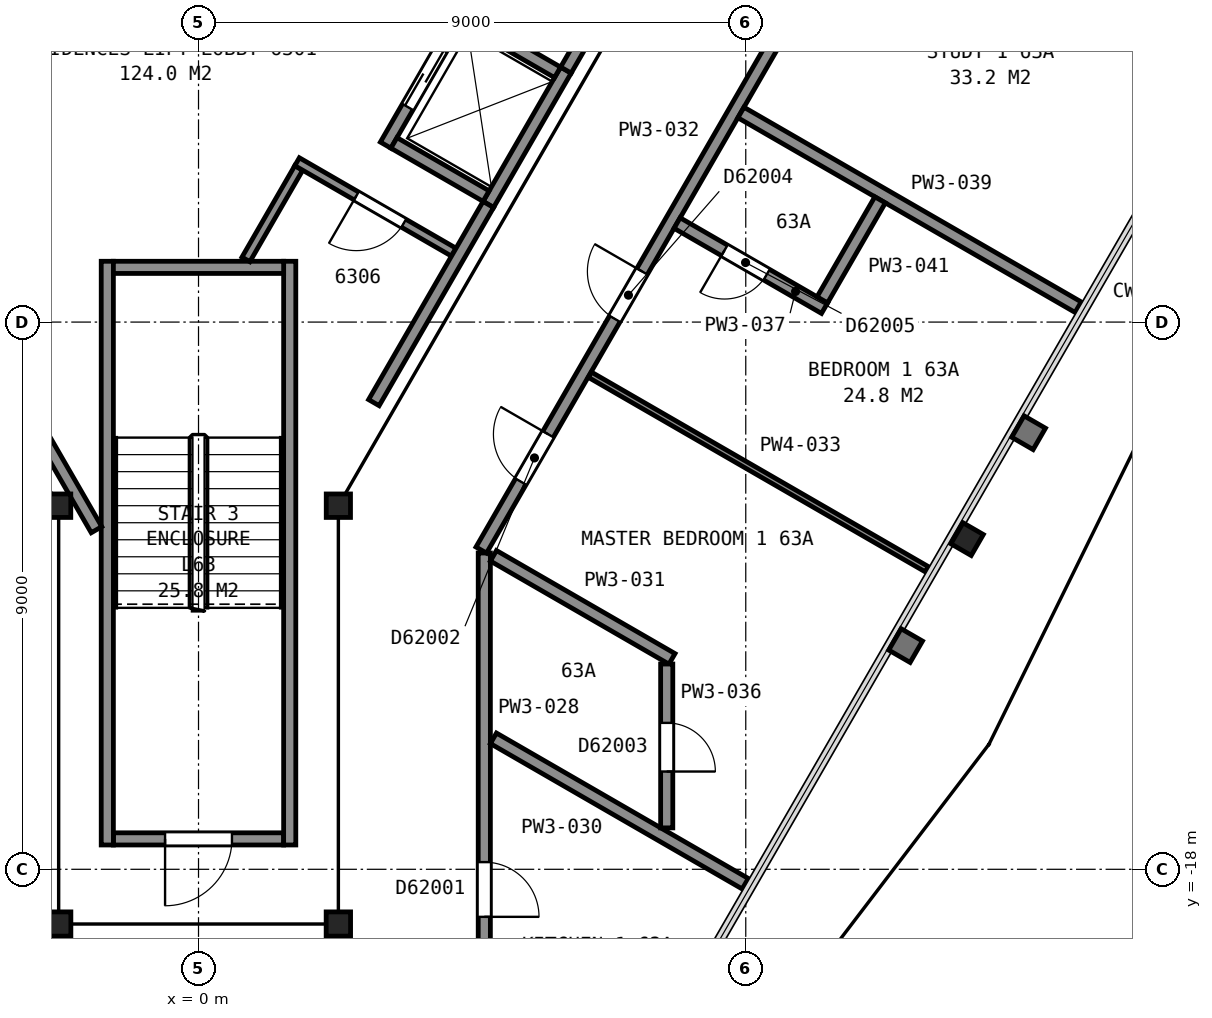
"""IFC4 building model, lengths in metres.
Left out: names, types, materials, properties, quantities, classifications, styles, units other than length and angle.
Written with IfcOpenShell. Run it as: python <this file> out.ifc"""

import sys

from ifc_helpers import new_model, si_unit, direction, frame, frame_2d, origin, origin_2d, place, context, subcontext, project, spatial, rectangle, i_section, extrude, element, fill, save


model = new_model("IFC4")
c1 = context("Model", 3, precision=1e-05, world=origin(), true_north=direction((0.0, 1.0)))
c2 = subcontext(c1, "Body", "Model", "MODEL_VIEW")
j1 = project(units=[si_unit("LENGTHUNIT", "METRE"), si_unit("PLANEANGLEUNIT", "RADIAN")], contexts=[c1])
p1 = place(None, origin())
s1 = spatial("IfcSite", under=j1, at=p1, CompositionType="ELEMENT")
p2 = place(p1, origin())
s2 = spatial("IfcBuilding", under=s1, at=p2, CompositionType="ELEMENT")
p3 = place(p2, frame((0.0, 0.0, 250.8)))
s3 = spatial("IfcBuildingStorey", under=s2, at=p3, CompositionType="ELEMENT", Elevation=250.8)
for number, where, z_axis, x_axis in (
    (1, (12.64, -12.57, 0.0), (0.0, 0.0, 1.0), (-0.5, -0.866, 0.0)),
    (2, (-2.3, -12.02, 0.0), (0.0, 0.0, 1.0), (1.0, 0.0, 0.0)),
):
    element("IfcColumn", number, at=place(p3, frame(where, z_axis=z_axis, x_axis=x_axis)), inside=s3, PredefinedType="COLUMN", context=c2, shape_type="SweptSolid", body=[
        extrude(i_section(OverallWidth=0.399, OverallDepth=0.386, WebThickness=0.021, FlangeThickness=0.033, FilletRadius=0.015, at=origin_2d()), origin(), (0.0, 0.0, 1.0), 3.7),
    ])
for number, where, z_axis, x_axis in (
    (3, (-2.3, -18.9, 0.0), (0.0, 0.0, 1.0), (-1.0, 0.0, 0.0)),
    (4, (2.3, -18.9, 0.0), (0.0, 0.0, 1.0), (-1.0, 0.0, 0.0)),
):
    element("IfcColumn", number, at=place(p3, frame(where, z_axis=z_axis, x_axis=x_axis)), inside=s3, PredefinedType="COLUMN", context=c2, shape_type="SweptSolid", body=[
        extrude(i_section(OverallWidth=0.401, OverallDepth=0.399, WebThickness=0.025, FlangeThickness=0.04, FilletRadius=0.015, at=origin_2d()), origin(), (0.0, 0.0, 1.0), 3.7),
    ])
p4 = place(p3, frame((2.3, -12.02, 0.0), z_axis=(0.0, 0.0, 1.0), x_axis=(1.0, 0.0, 0.0)))
e5 = element("IfcColumn", 5, at=p4, inside=s3, PredefinedType="COLUMN", context=c2, shape_type="SweptSolid", body=[
    extrude(i_section(OverallWidth=0.399, OverallDepth=0.386, WebThickness=0.021, FlangeThickness=0.033, FilletRadius=0.015, at=origin_2d()), origin(), (0.0, 0.0, 1.0), 3.7),
])
p5 = place(p3, frame((-1.4, -17.5, 0.0), z_axis=(0.0, 0.0, 1.0), x_axis=(1.0, 0.0, 0.0)))
e6 = element("IfcWall", 6, at=p5, inside=s3, PredefinedType="PARTITIONING", context=c2, shape_type="SweptSolid", body=[
    extrude(rectangle(XDim=2.8, YDim=0.2, at=frame_2d((1.4, 0.0))), origin(), (0.0, 0.0, 1.0), 3.45),
])
p6 = place(p5, frame((0.85, 0.0, 0.0)))
e7 = element("IfcOpeningElement", 7, at=p6, cuts=e6, PredefinedType="OPENING", context=c2, shape_type="SweptSolid", body=[
    extrude(rectangle(XDim=1.1, YDim=2.1, at=frame_2d((0.55, 1.05))), frame((0.0, 0.11, 0.0), z_axis=(0.0, -1.0, 0.0), x_axis=(1.0, 0.0, 0.0)), (0.0, 0.0, 1.0), 0.22),
])
for number, where, z_axis, x_axis in (
    (8, (1.5, -8.0, 0.0), (0.0, 0.0, 1.0), (0.0, -1.0, 0.0)),
    (9, (-1.5, -8.0, 0.0), (0.0, 0.0, 1.0), (0.0, -1.0, 0.0)),
):
    element("IfcWall", number, at=place(p3, frame(where, z_axis=z_axis, x_axis=x_axis)), inside=s3, PredefinedType="PARTITIONING", context=c2, shape_type="SweptSolid", body=[
        extrude(rectangle(XDim=9.6, YDim=0.2, at=frame_2d((4.8, 0.0))), origin(), (0.0, 0.0, 1.0), 3.45),
    ])
p7 = place(p3, frame((-1.4, -8.1, 0.0), z_axis=(0.0, 0.0, 1.0), x_axis=(1.0, 0.0, 0.0)))
e10 = element("IfcWall", 10, at=p7, inside=s3, PredefinedType="PARTITIONING", context=c2, shape_type="SweptSolid", body=[
    extrude(rectangle(XDim=2.8, YDim=0.2, at=frame_2d((1.4, 0.0))), origin(), (0.0, 0.0, 1.0), 3.45),
])
p8 = place(p3, frame((4.766, -7.065, 0.0), z_axis=(0.0, 0.0, 1.0), x_axis=(0.499948979701, 0.866054858364, 0.0)))
e11 = element("IfcWall", 11, at=p8, inside=s3, PredefinedType="PARTITIONING", context=c2, shape_type="SweptSolid", body=[
    extrude(rectangle(XDim=2.55, YDim=0.2, at=frame_2d((1.275, 0.0))), origin(), (0.0, 0.0, 1.0), 3.7),
])
p9 = place(p3, frame((3.077, -6.09, 0.0), z_axis=(0.0, 0.0, 1.0), x_axis=(0.500062241894, 0.865989465428, 0.0)))
e12 = element("IfcWall", 12, at=p9, inside=s3, PredefinedType="PARTITIONING", context=c2, shape_type="SweptSolid", body=[
    extrude(rectangle(XDim=2.55, YDim=0.2, at=frame_2d((1.275, 0.0))), origin(), (0.0, 0.0, 1.0), 3.7),
])
p10 = place(p9, frame((0.725, 0.0, 0.0)))
e13 = element("IfcOpeningElement", 13, at=p10, cuts=e12, PredefinedType="OPENING", context=c2, shape_type="SweptSolid", body=[
    extrude(rectangle(XDim=1.1, YDim=2.1, at=frame_2d((0.55, 1.05))), frame((0.0, 0.11, 0.0), z_axis=(0.0, -1.0, 0.0), x_axis=(1.0, 0.0, 0.0)), (0.0, 0.0, 1.0), 0.22),
])
p11 = place(p3, frame((5.905, -4.893, 0.0), z_axis=(0.0, 0.0, 1.0), x_axis=(-0.866002029911, 0.500040482552, 0.0)))
e14 = element("IfcWall", 14, at=p11, inside=s3, PredefinedType="PARTITIONING", context=c2, shape_type="SweptSolid", body=[
    extrude(rectangle(XDim=1.75, YDim=0.2, at=frame_2d((0.875, 0.0))), origin(), (0.0, 0.0, 1.0), 3.7),
])
p12 = place(p3, frame((4.73, -6.928, 0.0), z_axis=(0.0, 0.0, 1.0), x_axis=(-0.866036909293, 0.499980071345, 0.0)))
e15 = element("IfcWall", 15, at=p12, inside=s3, PredefinedType="PARTITIONING", context=c2, shape_type="SweptSolid", body=[
    extrude(rectangle(XDim=1.75, YDim=0.2, at=frame_2d((0.875, 0.0))), origin(), (0.0, 0.0, 1.0), 3.7),
])
p13 = place(p3, frame((-4.655, -7.257, 0.0), z_axis=(0.0, 0.0, 1.0), x_axis=(0.499966124405, -0.866044960985, 0.0)))
e16 = element("IfcWall", 16, at=p13, inside=s3, PredefinedType="PARTITIONING", context=c2, shape_type="SweptSolid", body=[
    extrude(rectangle(XDim=5.956, YDim=0.2, at=frame_2d((2.978, 0.0))), origin(), (0.0, 0.0, 1.0), 3.45),
])
p14 = place(p13, frame((0.45, 0.0, 0.0)))
e17 = element("IfcOpeningElement", 17, at=p14, cuts=e16, PredefinedType="OPENING", context=c2, shape_type="SweptSolid", body=[
    extrude(rectangle(XDim=1.8, YDim=2.1, at=frame_2d((0.9, 1.05))), frame((0.0, 0.11, 0.0), z_axis=(0.0, -1.0, 0.0), x_axis=(1.0, 0.0, 0.0)), (0.0, 0.0, 1.0), 0.22),
])
p15 = place(p3, frame((0.78, -7.97, 0.0), z_axis=(0.0, 0.0, 1.0), x_axis=(0.500022437694, 0.866012448988, 0.0)))
e18 = element("IfcWall", 18, at=p15, inside=s3, PredefinedType="PARTITIONING", context=c2, shape_type="SweptSolid", body=[
    extrude(rectangle(XDim=1.738, YDim=0.15, at=frame_2d((0.869, 0.0))), origin(), (0.0, 0.0, 1.0), 3.45),
])
p16 = place(p3, frame((4.198, -7.85, 0.0), z_axis=(0.0, 0.0, 1.0), x_axis=(-0.866017493347, 0.500013701029, 0.0)))
e19 = element("IfcWall", 19, at=p16, inside=s3, PredefinedType="PARTITIONING", context=c2, shape_type="SweptSolid", body=[
    extrude(rectangle(XDim=2.975, YDim=0.15, at=frame_2d((1.488, 0.0))), origin(), (0.0, 0.0, 1.0), 3.45),
])
p17 = place(p16, frame((0.95, 0.0, 0.0)))
e20 = element("IfcOpeningElement", 20, at=p17, cuts=e19, PredefinedType="OPENING", context=c2, shape_type="SweptSolid", body=[
    extrude(rectangle(XDim=0.9, YDim=2.1, at=frame_2d((0.45, 1.05))), frame((0.0, 0.085, 0.0), z_axis=(0.0, -1.0, 0.0), x_axis=(1.0, 0.0, 0.0)), (0.0, 0.0, 1.0), 0.17),
])
p18 = place(p3, frame((2.884, -10.325, 0.0), z_axis=(0.0, 0.0, 1.0), x_axis=(0.500094932804, 0.865970587366, 0.0)))
e21 = element("IfcWall", 21, at=p18, inside=s3, PredefinedType="PARTITIONING", context=c2, shape_type="SweptSolid", body=[
    extrude(rectangle(XDim=3.763, YDim=0.2, at=frame_2d((1.882, 0.0))), origin(), (0.0, 0.0, 1.0), 3.45),
])
p19 = place(p3, frame((6.042, -4.855, 0.0), z_axis=(0.0, 0.0, 1.0), x_axis=(0.500252727967, 0.865879442048, 0.0)))
e22 = element("IfcWall", 22, at=p19, inside=s3, PredefinedType="PARTITIONING", context=c2, shape_type="SweptSolid", body=[
    extrude(rectangle(XDim=2.617, YDim=0.2, at=frame_2d((1.309, 0.0))), origin(), (0.0, 0.0, 1.0), 3.45),
])
p20 = place(p3, frame((4.7, -12.798, 0.0), z_axis=(0.0, 0.0, 1.0), x_axis=(0.0, -1.0, 0.0)))
e23 = element("IfcWall", 23, at=p20, inside=s3, PredefinedType="PARTITIONING", context=c2, shape_type="SweptSolid", body=[
    extrude(rectangle(XDim=8.452, YDim=0.2, at=frame_2d((4.226, 0.0))), origin(), (0.0, 0.0, 1.0), 2.713),
])
p21 = place(p20, frame((5.084, 0.0, 0.0)))
e24 = element("IfcOpeningElement", 24, at=p21, cuts=e23, PredefinedType="OPENING", context=c2, shape_type="SweptSolid", body=[
    extrude(rectangle(XDim=0.9, YDim=2.1, at=frame_2d((0.45, 1.05))), frame((0.0, 0.11, 0.0), z_axis=(0.0, -1.0, 0.0), x_axis=(1.0, 0.0, 0.0)), (0.0, 0.0, 1.0), 0.22),
])
p22 = place(p3, frame((4.85, -15.846, 0.0), z_axis=(0.0, 0.0, 1.0), x_axis=(0.866007055173, -0.500031779381, 0.0)))
e25 = element("IfcWall", 25, at=p22, inside=s3, PredefinedType="PARTITIONING", context=c2, shape_type="SweptSolid", body=[
    extrude(rectangle(XDim=4.782, YDim=0.2, at=frame_2d((2.391, 0.0))), origin(), (0.0, 0.0, 1.0), 2.713),
])
p23 = place(p3, frame((4.85, -12.844, 0.0), z_axis=(0.0, 0.0, 1.0), x_axis=(0.866005731893, -0.500034071167, 0.0)))
e26 = element("IfcWall", 26, at=p23, inside=s3, PredefinedType="PARTITIONING", context=c2, shape_type="SweptSolid", body=[
    extrude(rectangle(XDim=3.391, YDim=0.2, at=frame_2d((1.695, 0.0))), origin(), (0.0, 0.0, 1.0), 2.713),
])
p24 = place(p3, frame((13.342, 2.306, 0.0), z_axis=(0.0, 0.0, 1.0), x_axis=(-0.499983003136, -0.866035216706, 0.0)))
e27 = element("IfcWall", 27, at=p24, inside=s3, PredefinedType="PARTITIONING", context=c2, shape_type="SweptSolid", body=[
    extrude(rectangle(XDim=17.385, YDim=0.2, at=frame_2d((8.692, 0.0))), origin(), (0.0, 0.0, 1.0), 2.713),
])
p25 = place(p24, frame((15.185, 0.0, 0.0)))
e28 = element("IfcOpeningElement", 28, at=p25, cuts=e27, PredefinedType="OPENING", context=c2, shape_type="SweptSolid", body=[
    extrude(rectangle(XDim=0.9, YDim=2.1, at=frame_2d((0.45, 1.05))), frame((0.0, 0.11, 0.0), z_axis=(0.0, -1.0, 0.0), x_axis=(1.0, 0.0, 0.0)), (0.0, 0.0, 1.0), 0.22),
])
p26 = place(p24, frame((12.094, 0.0, 0.0)))
e29 = element("IfcOpeningElement", 29, at=p26, cuts=e27, PredefinedType="OPENING", context=c2, shape_type="SweptSolid", body=[
    extrude(rectangle(XDim=0.9, YDim=2.1, at=frame_2d((0.45, 1.05))), frame((0.0, 0.11, 0.0), z_axis=(0.0, -1.0, 0.0), x_axis=(1.0, 0.0, 0.0)), (0.0, 0.0, 1.0), 0.22),
])
p27 = place(p24, frame((5.867, 0.0, 0.0)))
e30 = element("IfcOpeningElement", 30, at=p27, cuts=e27, PredefinedType="OPENING", context=c2, shape_type="SweptSolid", body=[
    extrude(rectangle(XDim=0.9, YDim=2.1, at=frame_2d((0.45, 1.05))), frame((0.0, 0.11, 0.0), z_axis=(0.0, -1.0, 0.0), x_axis=(1.0, 0.0, 0.0)), (0.0, 0.0, 1.0), 0.22),
])
p28 = place(p24, frame((1.392, 0.0, 0.0)))
e31 = element("IfcOpeningElement", 31, at=p28, cuts=e27, PredefinedType="OPENING", context=c2, shape_type="SweptSolid", body=[
    extrude(rectangle(XDim=0.9, YDim=2.1, at=frame_2d((0.45, 1.05))), frame((0.0, 0.11, 0.0), z_axis=(0.0, -1.0, 0.0), x_axis=(1.0, 0.0, 0.0)), (0.0, 0.0, 1.0), 0.22),
])
p29 = place(p3, frame((6.436, -9.865, 0.0), z_axis=(0.0, 0.0, 1.0), x_axis=(0.866013405822, -0.500020780506, 0.0)))
e32 = element("IfcWall", 32, at=p29, inside=s3, PredefinedType="PARTITIONING", context=c2, shape_type="SweptSolid", body=[
    extrude(rectangle(XDim=6.399, YDim=0.1, at=frame_2d((3.2, 0.0))), origin(), (0.0, 0.0, 1.0), 2.713),
])
p30 = place(p3, frame((7.7, -17.319, 0.0), z_axis=(0.0, 0.0, 1.0), x_axis=(0.0, 1.0, 0.0)))
e33 = element("IfcWall", 33, at=p30, inside=s3, PredefinedType="PARTITIONING", context=c2, shape_type="SweptSolid", body=[
    extrude(rectangle(XDim=2.695, YDim=0.2, at=frame_2d((1.347, 0.0))), origin(), (0.0, 0.0, 1.0), 2.713),
])
p31 = place(p30, frame((0.927, 0.0, 0.0)))
e34 = element("IfcOpeningElement", 34, at=p31, cuts=e33, PredefinedType="OPENING", context=c2, shape_type="SweptSolid", body=[
    extrude(rectangle(XDim=0.8, YDim=2.1, at=frame_2d((0.4, 1.05))), frame((0.0, 0.11, 0.0), z_axis=(0.0, -1.0, 0.0), x_axis=(1.0, 0.0, 0.0)), (0.0, 0.0, 1.0), 0.22),
])
p32 = place(p3, frame((7.871, -7.371, 0.0), z_axis=(0.0, 0.0, 1.0), x_axis=(0.866056369097, -0.49994636267, 0.0)))
e35 = element("IfcWall", 35, at=p32, inside=s3, PredefinedType="PARTITIONING", context=c2, shape_type="SweptSolid", body=[
    extrude(rectangle(XDim=2.8, YDim=0.2, at=frame_2d((1.4, 0.0))), origin(), (0.0, 0.0, 1.0), 2.713),
])
p33 = place(p32, frame((0.9, 0.0, 0.0)))
e36 = element("IfcOpeningElement", 36, at=p33, cuts=e35, PredefinedType="OPENING", context=c2, shape_type="SweptSolid", body=[
    extrude(rectangle(XDim=0.8, YDim=2.1, at=frame_2d((0.4, 1.05))), frame((0.0, 0.11, 0.0), z_axis=(0.0, -1.0, 0.0), x_axis=(1.0, 0.0, 0.0)), (0.0, 0.0, 1.0), 0.22),
])
p34 = place(p3, frame((8.921, -5.553, 0.0), z_axis=(0.0, 0.0, 1.0), x_axis=(0.866026868306, -0.499997463366, 0.0)))
e37 = element("IfcWall", 37, at=p34, inside=s3, PredefinedType="PARTITIONING", context=c2, shape_type="SweptSolid", body=[
    extrude(rectangle(XDim=6.404, YDim=0.2, at=frame_2d((3.202, 0.0))), origin(), (0.0, 0.0, 1.0), 2.713),
])
p35 = place(p3, frame((10.259, -8.635, 0.0), z_axis=(0.0, 0.0, 1.0), x_axis=(0.500078449558, 0.865980106173, 0.0)))
e38 = element("IfcWall", 38, at=p35, inside=s3, PredefinedType="PARTITIONING", context=c2, shape_type="SweptSolid", body=[
    extrude(rectangle(XDim=1.9, YDim=0.2, at=frame_2d((0.95, 0.0))), origin(), (0.0, 0.0, 1.0), 2.713),
])
p36 = place(p6, origin())
e39 = element("IfcDoor", 39, at=p36, inside=s3, OperationType="SINGLE_SWING_LEFT", PredefinedType="DOOR", context=c2, shape_type="SweptSolid", body=[
    extrude(rectangle(XDim=1.1, YDim=2.1, at=frame_2d((0.55, 1.05))), frame((0.0, 0.025, 0.0), z_axis=(0.0, -1.0, 0.0), x_axis=(1.0, 0.0, 0.0)), (0.0, 0.0, 1.0), 0.05),
])
fill(e7, e39)
p37 = place(p10, origin())
e40 = element("IfcDoor", 40, at=p37, inside=s3, OperationType="SLIDING_TO_LEFT", PredefinedType="DOOR", context=c2, shape_type="SweptSolid", body=[
    extrude(rectangle(XDim=1.1, YDim=2.1, at=frame_2d((0.55, 1.05))), frame((0.0, 0.025, 0.0), z_axis=(0.0, -1.0, 0.0), x_axis=(1.0, 0.0, 0.0)), (0.0, 0.0, 1.0), 0.05),
])
fill(e13, e40)
p38 = place(p17, origin())
e41 = element("IfcDoor", 41, at=p38, inside=s3, OperationType="SINGLE_SWING_RIGHT", PredefinedType="DOOR", context=c2, shape_type="SweptSolid", body=[
    extrude(rectangle(XDim=0.9, YDim=2.1, at=frame_2d((0.45, 1.05))), frame((0.0, 0.025, 0.0), z_axis=(0.0, -1.0, 0.0), x_axis=(1.0, 0.0, 0.0)), (0.0, 0.0, 1.0), 0.05),
])
fill(e20, e41)
p39 = place(p21, origin())
e42 = element("IfcDoor", 42, at=p39, inside=s3, OperationType="SINGLE_SWING_RIGHT", PredefinedType="DOOR", context=c2, shape_type="SweptSolid", body=[
    extrude(rectangle(XDim=0.9, YDim=2.1, at=frame_2d((0.45, 1.05))), frame((0.0, 0.025, 0.0), z_axis=(0.0, -1.0, 0.0), x_axis=(1.0, 0.0, 0.0)), (0.0, 0.0, 1.0), 0.05),
])
fill(e24, e42)
p40 = place(p25, origin())
e43 = element("IfcDoor", 43, at=p40, inside=s3, OperationType="SINGLE_SWING_LEFT", PredefinedType="DOOR", context=c2, shape_type="SweptSolid", body=[
    extrude(rectangle(XDim=0.9, YDim=2.1, at=frame_2d((0.45, 1.05))), frame((0.0, 0.025, 0.0), z_axis=(0.0, -1.0, 0.0), x_axis=(1.0, 0.0, 0.0)), (0.0, 0.0, 1.0), 0.05),
])
fill(e28, e43)
p41 = place(p26, origin())
e44 = element("IfcDoor", 44, at=p41, inside=s3, OperationType="SINGLE_SWING_LEFT", PredefinedType="DOOR", context=c2, shape_type="SweptSolid", body=[
    extrude(rectangle(XDim=0.9, YDim=2.1, at=frame_2d((0.45, 1.05))), frame((0.0, 0.025, 0.0), z_axis=(0.0, -1.0, 0.0), x_axis=(1.0, 0.0, 0.0)), (0.0, 0.0, 1.0), 0.05),
])
fill(e29, e44)
p42 = place(p31, origin())
e45 = element("IfcDoor", 45, at=p42, inside=s3, OperationType="SINGLE_SWING_LEFT", PredefinedType="DOOR", context=c2, shape_type="SweptSolid", body=[
    extrude(rectangle(XDim=0.8, YDim=2.1, at=frame_2d((0.4, 1.05))), frame((0.0, 0.025, 0.0), z_axis=(0.0, -1.0, 0.0), x_axis=(1.0, 0.0, 0.0)), (0.0, 0.0, 1.0), 0.05),
])
fill(e34, e45)
p43 = place(p33, origin())
e46 = element("IfcDoor", 46, at=p43, inside=s3, OperationType="SINGLE_SWING_LEFT", PredefinedType="DOOR", context=c2, shape_type="SweptSolid", body=[
    extrude(rectangle(XDim=0.8, YDim=2.1, at=frame_2d((0.4, 1.05))), frame((0.0, 0.025, 0.0), z_axis=(0.0, -1.0, 0.0), x_axis=(1.0, 0.0, 0.0)), (0.0, 0.0, 1.0), 0.05),
])
fill(e36, e46)
save(model, sys.argv[1])
